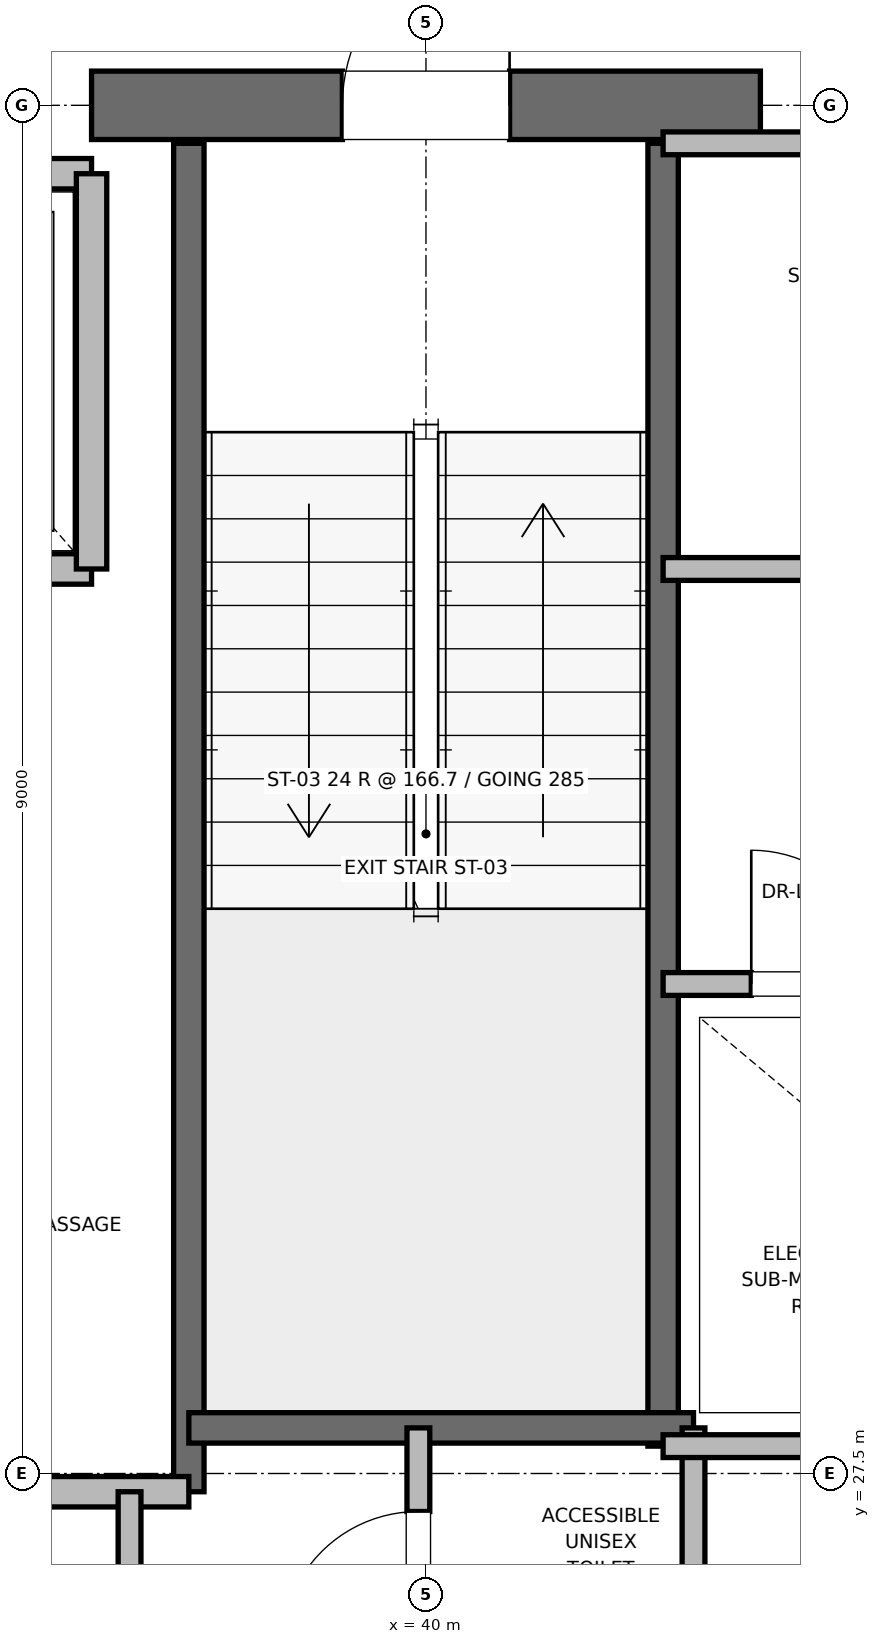
"""IFC4 building model, lengths in metres.
Left out: names, types, materials, properties, quantities, classifications, styles, units other than length and angle.
Written with IfcOpenShell. Run it as: python <this file> out.ifc"""

import sys

from ifc_helpers import new_model, si_unit, direction, frame, frame_2d, origin, place, context, subcontext, project, spatial, rectangle, extrude, element, fill, save


model = new_model("IFC4")
c1 = context("Model", 3, precision=1e-05, world=origin(), true_north=direction((0.0, 1.0)))
c2 = subcontext(c1, "Body", "Model", "MODEL_VIEW")
j1 = project(units=[si_unit("LENGTHUNIT", "METRE"), si_unit("PLANEANGLEUNIT", "RADIAN")], contexts=[c1])
p1 = place(None, origin())
s1 = spatial("IfcSite", under=j1, at=p1, CompositionType="ELEMENT")
p2 = place(p1, origin())
s2 = spatial("IfcBuilding", under=s1, at=p2, CompositionType="ELEMENT")
p3 = place(p2, frame((0.0, 0.0, 271.2)))
s3 = spatial("IfcBuildingStorey", under=s2, at=p3, CompositionType="ELEMENT", Elevation=271.2)
p4 = place(p3, frame((37.8, 36.5, 0.0), z_axis=(0.0, 0.0, 1.0), x_axis=(1.0, 0.0, 0.0)))
e1 = element("IfcWall", 1, at=p4, inside=s3, PredefinedType="SHEAR", context=c2, shape_type="SweptSolid", body=[
    extrude(rectangle(XDim=4.4, YDim=0.45, at=frame_2d((2.2, 0.0))), origin(), (0.0, 0.0, 1.0), 3.785),
])
p5 = place(p4, frame((1.65, 0.0, 0.0)))
e2 = element("IfcOpeningElement", 2, at=p5, cuts=e1, PredefinedType="OPENING", context=c2, shape_type="SweptSolid", body=[
    extrude(rectangle(XDim=1.1, YDim=2.15, at=frame_2d((0.55, 1.075))), frame((0.0, 0.225, 0.0), z_axis=(0.0, -1.0, 0.0), x_axis=(1.0, 0.0, 0.0)), (0.0, 0.0, 1.0), 0.45),
])
p6 = place(p3, frame((38.44, 27.38, 0.0), z_axis=(0.0, 0.0, 1.0), x_axis=(0.0, 1.0, 0.0)))
e3 = element("IfcWall", 3, at=p6, inside=s3, PredefinedType="SOLIDWALL", context=c2, shape_type="SweptSolid", body=[
    extrude(rectangle(XDim=8.87, YDim=0.2, at=frame_2d((4.435, 0.0))), origin(), (0.0, 0.0, 1.0), 3.785),
])
p7 = place(p3, frame((41.56, 27.68, 0.0), z_axis=(0.0, 0.0, 1.0), x_axis=(0.0, 1.0, 0.0)))
e4 = element("IfcWall", 4, at=p7, inside=s3, PredefinedType="SOLIDWALL", context=c2, shape_type="SweptSolid", body=[
    extrude(rectangle(XDim=8.57, YDim=0.2, at=frame_2d((4.285, 0.0))), origin(), (0.0, 0.0, 1.0), 3.785),
])
p8 = place(p3, frame((38.44, 27.8, 0.0), z_axis=(0.0, 0.0, 1.0), x_axis=(1.0, 0.0, 0.0)))
e5 = element("IfcWall", 5, at=p8, inside=s3, PredefinedType="SOLIDWALL", context=c2, shape_type="SweptSolid", body=[
    extrude(rectangle(XDim=3.32, YDim=0.2, at=frame_2d((1.66, 0.0))), origin(), (0.0, 0.0, 1.0), 3.785),
])
p9 = place(p3, frame((32.82, 27.38, 0.0), z_axis=(0.0, 0.0, 1.0), x_axis=(1.0, 0.0, 0.0)))
e6 = element("IfcWall", 6, at=p9, inside=s3, PredefinedType="PARTITIONING", context=c2, shape_type="SweptSolid", body=[
    extrude(rectangle(XDim=5.62, YDim=0.2, at=frame_2d((2.81, 0.0))), origin(), (0.0, 0.0, 1.0), 3.785),
])
p10 = place(p3, frame((35.5, 33.45, 0.0), z_axis=(0.0, 0.0, 1.0), x_axis=(1.0, 0.0, 0.0)))
e7 = element("IfcWall", 7, at=p10, inside=s3, PredefinedType="SOLIDWALL", context=c2, shape_type="SweptSolid", body=[
    extrude(rectangle(XDim=2.3, YDim=0.2, at=frame_2d((1.15, 0.0))), origin(), (0.0, 0.0, 1.0), 3.785),
])
p11 = place(p10, frame((0.6, 0.0, 0.0)))
e8 = element("IfcOpeningElement", 8, at=p11, cuts=e7, PredefinedType="OPENING", context=c2, shape_type="SweptSolid", body=[
    extrude(rectangle(XDim=1.1, YDim=2.2, at=frame_2d((0.55, 1.1))), frame((0.0, 0.1, 0.0), z_axis=(0.0, -1.0, 0.0), x_axis=(1.0, 0.0, 0.0)), (0.0, 0.0, 1.0), 0.2),
])
p12 = place(p3, frame((37.8, 36.05, 0.0), z_axis=(0.0, 0.0, 1.0), x_axis=(-1.0, 0.0, 0.0)))
e9 = element("IfcWall", 9, at=p12, inside=s3, PredefinedType="SOLIDWALL", context=c2, shape_type="SweptSolid", body=[
    extrude(rectangle(XDim=2.3, YDim=0.2, at=frame_2d((1.15, 0.0))), origin(), (0.0, 0.0, 1.0), 2.865),
])
p13 = place(p3, frame((37.8, 33.45, 0.0), z_axis=(0.0, 0.0, 1.0), x_axis=(0.0, 1.0, 0.0)))
e10 = element("IfcWall", 10, at=p13, inside=s3, PredefinedType="SOLIDWALL", context=c2, shape_type="SweptSolid", body=[
    extrude(rectangle(XDim=2.6, YDim=0.2, at=frame_2d((1.3, 0.0))), origin(), (0.0, 0.0, 1.0), 2.865),
])
p14 = place(p3, frame((41.76, 23.8, 0.0), z_axis=(0.0, 0.0, 1.0), x_axis=(0.0, 1.0, 0.0)))
e11 = element("IfcWall", 11, at=p14, inside=s3, PredefinedType="PARTITIONING", context=c2, shape_type="SweptSolid", body=[
    extrude(rectangle(XDim=4.0, YDim=0.15, at=frame_2d((2.0, 0.0))), origin(), (0.0, 0.0, 1.0), 2.85),
])
p15 = place(p3, frame((39.95, 25.8, 0.0), z_axis=(0.0, 0.0, 1.0), x_axis=(0.0, 1.0, 0.0)))
e12 = element("IfcWall", 12, at=p15, inside=s3, PredefinedType="PARTITIONING", context=c2, shape_type="SweptSolid", body=[
    extrude(rectangle(XDim=2.0, YDim=0.15, at=frame_2d((1.0, 0.0))), origin(), (0.0, 0.0, 1.0), 2.85),
])
p16 = place(p15, frame((0.55, 0.0, 0.0)))
e13 = element("IfcOpeningElement", 13, at=p16, cuts=e12, PredefinedType="OPENING", context=c2, shape_type="SweptSolid", body=[
    extrude(rectangle(XDim=0.9, YDim=2.1, at=frame_2d((0.45, 1.05))), frame((0.0, 0.075, 0.0), z_axis=(0.0, -1.0, 0.0), x_axis=(1.0, 0.0, 0.0)), (0.0, 0.0, 1.0), 0.15),
])
p17 = place(p3, frame((38.05, 24.5, 0.0), z_axis=(0.0, 0.0, 1.0), x_axis=(0.0, 1.0, 0.0)))
e14 = element("IfcWall", 14, at=p17, inside=s3, PredefinedType="PARTITIONING", context=c2, shape_type="SweptSolid", body=[
    extrude(rectangle(XDim=2.88, YDim=0.15, at=frame_2d((1.44, 0.0))), origin(), (0.0, 0.0, 1.0), 2.85),
])
p18 = place(p17, frame((0.94, 0.0, 0.0)))
e15 = element("IfcOpeningElement", 15, at=p18, cuts=e14, PredefinedType="OPENING", context=c2, shape_type="SweptSolid", body=[
    extrude(rectangle(XDim=1.0, YDim=2.15, at=frame_2d((0.5, 1.075))), frame((0.0, 0.075, 0.0), z_axis=(0.0, -1.0, 0.0), x_axis=(1.0, 0.0, 0.0)), (0.0, 0.0, 1.0), 0.15),
])
p19 = place(p3, frame((41.56, 27.68, 0.0), z_axis=(0.0, 0.0, 1.0), x_axis=(1.0, 0.0, 0.0)))
e16 = element("IfcWall", 16, at=p19, inside=s3, PredefinedType="PARTITIONING", context=c2, shape_type="SweptSolid", body=[
    extrude(rectangle(XDim=3.59, YDim=0.15, at=frame_2d((1.795, 0.0))), origin(), (0.0, 0.0, 1.0), 2.85),
])
p20 = place(p3, frame((41.56, 30.72, 0.0), z_axis=(0.0, 0.0, 1.0), x_axis=(1.0, 0.0, 0.0)))
e17 = element("IfcWall", 17, at=p20, inside=s3, PredefinedType="PARTITIONING", context=c2, shape_type="SweptSolid", body=[
    extrude(rectangle(XDim=2.04, YDim=0.15, at=frame_2d((1.02, 0.0))), origin(), (0.0, 0.0, 1.0), 2.85),
])
p21 = place(p20, frame((0.58, 0.0, 0.0)))
e18 = element("IfcOpeningElement", 18, at=p21, cuts=e17, PredefinedType="OPENING", context=c2, shape_type="SweptSolid", body=[
    extrude(rectangle(XDim=0.88, YDim=2.1, at=frame_2d((0.44, 1.05))), frame((0.0, 0.075, 0.0), z_axis=(0.0, -1.0, 0.0), x_axis=(1.0, 0.0, 0.0)), (0.0, 0.0, 1.0), 0.15),
])
p22 = place(p3, frame((41.56, 36.25, 0.0), z_axis=(0.0, 0.0, 1.0), x_axis=(1.0, 0.0, 0.0)))
e19 = element("IfcWall", 19, at=p22, inside=s3, PredefinedType="PARTITIONING", context=c2, shape_type="SweptSolid", body=[
    extrude(rectangle(XDim=2.94, YDim=0.15, at=frame_2d((1.47, 0.0))), origin(), (0.0, 0.0, 1.0), 2.85),
])
p23 = place(p3, frame((41.56, 33.45, 0.0), z_axis=(0.0, 0.0, 1.0), x_axis=(1.0, 0.0, 0.0)))
e20 = element("IfcWall", 20, at=p23, inside=s3, PredefinedType="PARTITIONING", context=c2, shape_type="SweptSolid", body=[
    extrude(rectangle(XDim=2.94, YDim=0.15, at=frame_2d((1.47, 0.0))), origin(), (0.0, 0.0, 1.0), 2.85),
])
p24 = place(p23, frame((1.03, 0.0, 0.0)))
e21 = element("IfcOpeningElement", 21, at=p24, cuts=e20, PredefinedType="OPENING", context=c2, shape_type="SweptSolid", body=[
    extrude(rectangle(XDim=0.88, YDim=2.1, at=frame_2d((0.44, 1.05))), frame((0.0, 0.075, 0.0), z_axis=(0.0, -1.0, 0.0), x_axis=(1.0, 0.0, 0.0)), (0.0, 0.0, 1.0), 0.15),
])
p25 = place(p5, origin())
e22 = element("IfcDoor", 22, at=p25, inside=s3, OperationType="SINGLE_SWING_RIGHT", PredefinedType="DOOR", context=c2, shape_type="SweptSolid", body=[
    extrude(rectangle(XDim=1.1, YDim=2.15, at=frame_2d((0.55, 1.075))), frame((0.0, 0.025, 0.0), z_axis=(0.0, -1.0, 0.0), x_axis=(1.0, 0.0, 0.0)), (0.0, 0.0, 1.0), 0.05),
])
fill(e2, e22)
p26 = place(p16, origin())
e23 = element("IfcDoor", 23, at=p26, inside=s3, OperationType="SINGLE_SWING_LEFT", PredefinedType="DOOR", context=c2, shape_type="SweptSolid", body=[
    extrude(rectangle(XDim=0.9, YDim=2.1, at=frame_2d((0.45, 1.05))), frame((0.0, 0.025, 0.0), z_axis=(0.0, -1.0, 0.0), x_axis=(1.0, 0.0, 0.0)), (0.0, 0.0, 1.0), 0.05),
])
fill(e13, e23)
p27 = place(p21, origin())
e24 = element("IfcDoor", 24, at=p27, inside=s3, OperationType="SINGLE_SWING_LEFT", PredefinedType="DOOR", context=c2, shape_type="SweptSolid", body=[
    extrude(rectangle(XDim=0.88, YDim=2.1, at=frame_2d((0.44, 1.05))), frame((0.0, 0.025, 0.0), z_axis=(0.0, -1.0, 0.0), x_axis=(1.0, 0.0, 0.0)), (0.0, 0.0, 1.0), 0.05),
])
fill(e18, e24)
save(model, sys.argv[1])
